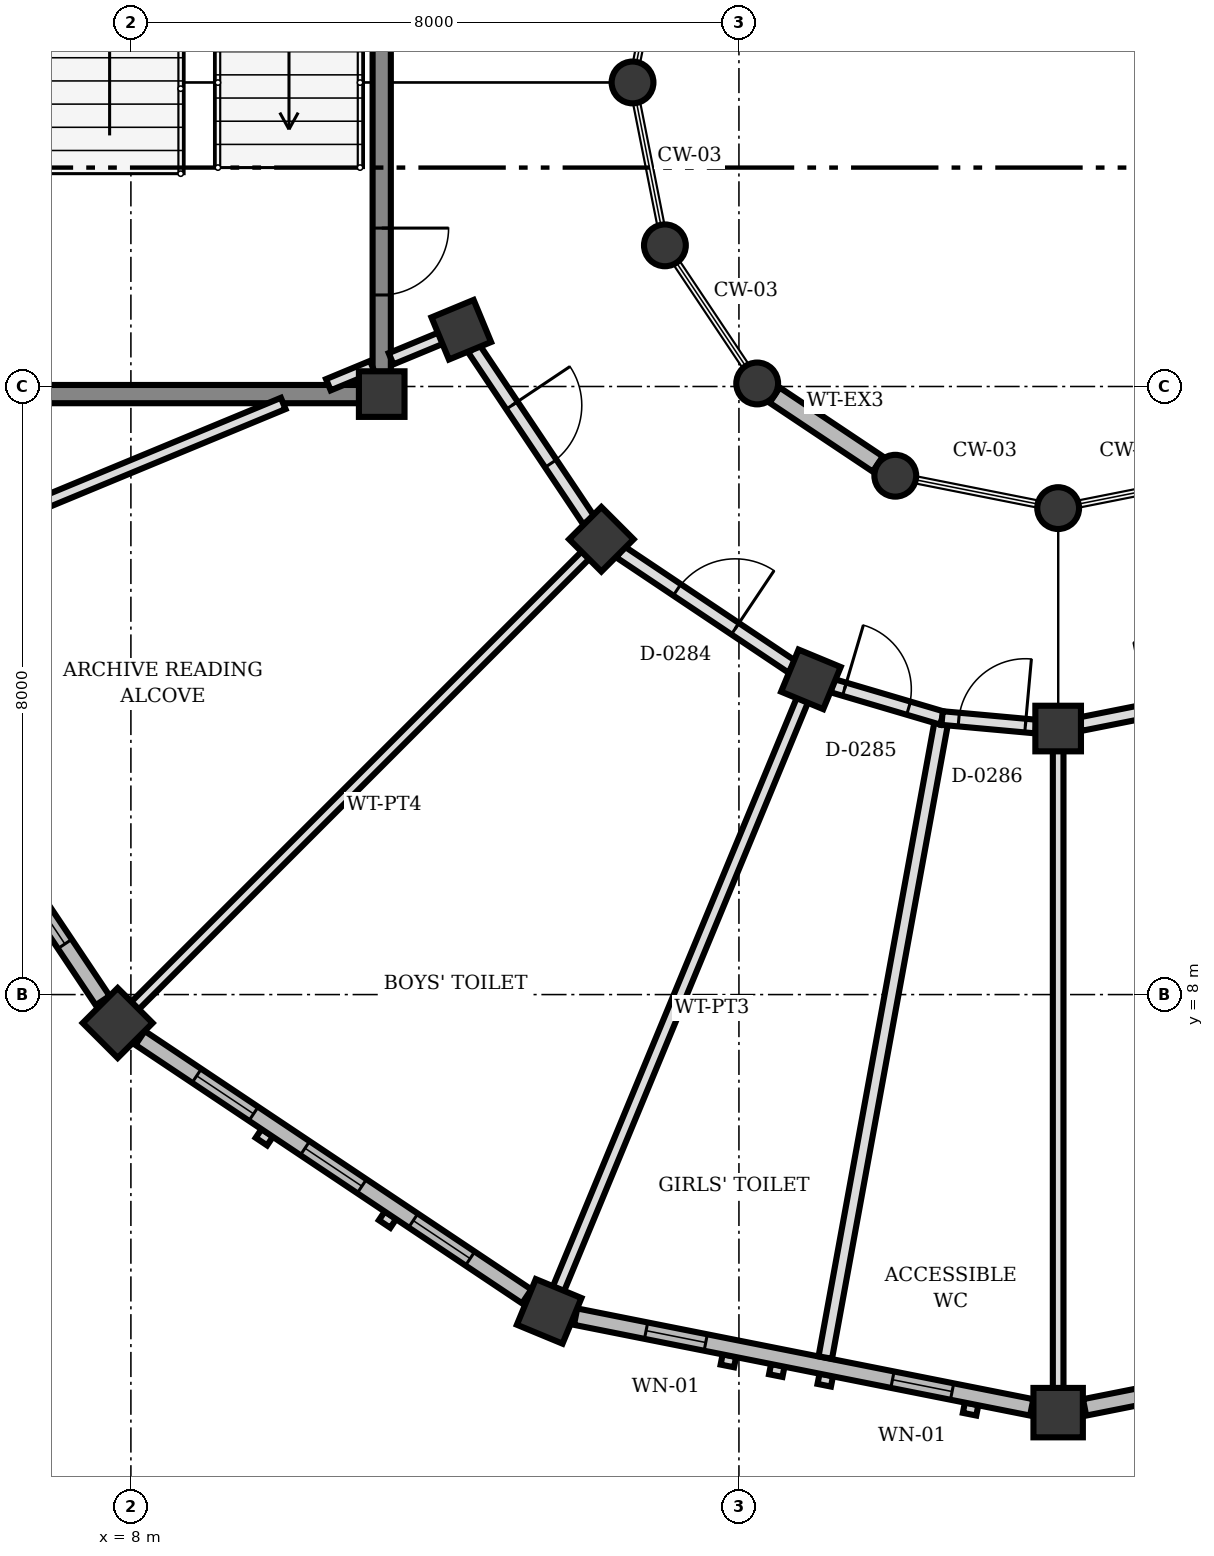
"""IFC4 building model, lengths in metres.
Left out: names, types, materials, properties, quantities, classifications, styles, units other than length and angle.
Written with IfcOpenShell. Run it as: python <this file> out.ifc"""

import sys

from ifc_helpers import new_model, si_unit, direction, frame, frame_2d, origin, origin_2d, place, context, subcontext, project, spatial, rectangle, circle, extrude, element, fill, save


model = new_model("IFC4")
c1 = context("Model", 3, precision=1e-05, world=origin(), true_north=direction((0.0, 1.0)))
c2 = subcontext(c1, "Body", "Model", "MODEL_VIEW")
j1 = project(units=[si_unit("LENGTHUNIT", "METRE"), si_unit("PLANEANGLEUNIT", "RADIAN")], contexts=[c1])
p1 = place(None, origin())
s1 = spatial("IfcSite", under=j1, at=p1, CompositionType="ELEMENT")
p2 = place(p1, origin())
s2 = spatial("IfcBuilding", under=s1, at=p2, CompositionType="ELEMENT")
p3 = place(p2, origin())
s3 = spatial("IfcBuildingStorey", under=s2, at=p3, CompositionType="ELEMENT", Elevation=0.0)
p4 = place(p3, frame((11.3, 15.9, 0.0), z_axis=(0.0, 0.0, 1.0), x_axis=(1.0, 0.0, 0.0)))
e1 = element("IfcColumn", 1, at=p4, inside=s3, PredefinedType="COLUMN", context=c2, shape_type="SweptSolid", body=[
    extrude(rectangle(XDim=0.6, YDim=0.6, at=origin_2d()), origin(), (0.0, 0.0, 1.0), 4.5),
])
for number, where, z_axis, x_axis in (
    (2, (14.6, 20.0, 0.0), (0.0, 0.0, 1.0), (1.0, 0.0, 0.0)),
    (3, (15.026, 17.857, 0.0), (0.0, 0.0, 1.0), (1.0, 0.0, 0.0)),
    (4, (16.24, 16.04, 0.0), (0.0, 0.0, 1.0), (1.0, 0.0, 0.0)),
    (5, (18.057, 14.826, 0.0), (0.0, 0.0, 1.0), (1.0, 0.0, 0.0)),
    (6, (20.2, 14.4, 0.0), (0.0, 0.0, 1.0), (1.0, 0.0, 0.0)),
):
    element("IfcColumn", number, at=place(p3, frame(where, z_axis=z_axis, x_axis=x_axis)), inside=s3, PredefinedType="COLUMN", context=c2, shape_type="SweptSolid", body=[
        extrude(circle(Radius=0.275, at=origin_2d()), origin(), (0.0, 0.0, 1.0), 4.5),
    ])
for number, where, z_axis, x_axis in (
    (7, (12.347, 16.747, 0.0), (0.0, 0.0, 1.0), (-0.924, -0.383, 0.0)),
    (8, (14.19, 13.99, 0.0), (0.0, 0.0, 1.0), (-0.707, -0.707, 0.0)),
    (9, (16.947, 12.147, 0.0), (0.0, 0.0, 1.0), (-0.383, -0.924, 0.0)),
    (10, (20.2, 11.5, 0.0), (0.0, 0.0, 1.0), (0.0, -1.0, 0.0)),
):
    element("IfcColumn", number, at=place(p3, frame(where, z_axis=z_axis, x_axis=x_axis)), inside=s3, PredefinedType="COLUMN", context=c2, shape_type="SweptSolid", body=[
        extrude(rectangle(XDim=0.6, YDim=0.6, at=origin_2d()), origin(), (0.0, 0.0, 1.0), 4.5),
    ])
for number, where, z_axis, x_axis in (
    (11, (7.826, 7.626, 0.0), (0.0, 0.0, 1.0), (-0.707, -0.707, 0.0)),
    (12, (13.503, 3.832, 0.0), (0.0, 0.0, 1.0), (-0.383, -0.924, 0.0)),
    (13, (20.2, 2.5, 0.0), (0.0, 0.0, 1.0), (0.0, -1.0, 0.0)),
):
    element("IfcColumn", number, at=place(p3, frame(where, z_axis=z_axis, x_axis=x_axis)), inside=s3, PredefinedType="COLUMN", context=c2, shape_type="SweptSolid", body=[
        extrude(rectangle(XDim=0.65, YDim=0.65, at=origin_2d()), origin(), (0.0, 0.0, 1.0), 4.5),
    ])
p5 = place(p3, frame((7.629, 7.921, 0.0), z_axis=(0.0, 0.0, 1.0), x_axis=(-0.555657446161, 0.831411331728, 0.0)))
e14 = element("IfcWall", 14, at=p5, inside=s3, PredefinedType="SOLIDWALL", context=c2, shape_type="SweptSolid", body=[
    extrude(rectangle(XDim=6.119, YDim=0.22, at=frame_2d((3.059, 0.0))), origin(), (0.0, 0.0, 1.0), 3.55),
])
p6 = place(p5, frame((0.896, 0.0, 0.85)))
e15 = element("IfcOpeningElement", 15, at=p6, cuts=e14, PredefinedType="OPENING", context=c2, shape_type="SweptSolid", body=[
    extrude(rectangle(XDim=0.9, YDim=1.4, at=frame_2d((0.45, 0.7))), frame((0.0, 0.12, 0.0), z_axis=(0.0, -1.0, 0.0), x_axis=(1.0, 0.0, 0.0)), (0.0, 0.0, 1.0), 0.24),
])
p7 = place(p5, frame((2.609, 0.0, 0.85)))
e16 = element("IfcOpeningElement", 16, at=p7, cuts=e14, PredefinedType="OPENING", context=c2, shape_type="SweptSolid", body=[
    extrude(rectangle(XDim=0.9, YDim=1.4, at=frame_2d((0.45, 0.7))), frame((0.0, 0.12, 0.0), z_axis=(0.0, -1.0, 0.0), x_axis=(1.0, 0.0, 0.0)), (0.0, 0.0, 1.0), 0.24),
])
p8 = place(p5, frame((4.323, 0.0, 0.85)))
e17 = element("IfcOpeningElement", 17, at=p8, cuts=e14, PredefinedType="OPENING", context=c2, shape_type="SweptSolid", body=[
    extrude(rectangle(XDim=0.9, YDim=1.4, at=frame_2d((0.45, 0.7))), frame((0.0, 0.12, 0.0), z_axis=(0.0, -1.0, 0.0), x_axis=(1.0, 0.0, 0.0)), (0.0, 0.0, 1.0), 0.24),
])
p9 = place(p3, frame((13.208, 4.029, 0.0), z_axis=(0.0, 0.0, 1.0), x_axis=(-0.83139901156, 0.555675879967, 0.0)))
e18 = element("IfcWall", 18, at=p9, inside=s3, PredefinedType="SOLIDWALL", context=c2, shape_type="SweptSolid", body=[
    extrude(rectangle(XDim=6.118, YDim=0.22, at=frame_2d((3.059, 0.0))), origin(), (0.0, 0.0, 1.0), 3.55),
])
p10 = place(p9, frame((0.896, 0.0, 0.85)))
e19 = element("IfcOpeningElement", 19, at=p10, cuts=e18, PredefinedType="OPENING", context=c2, shape_type="SweptSolid", body=[
    extrude(rectangle(XDim=0.9, YDim=1.4, at=frame_2d((0.45, 0.7))), frame((0.0, 0.12, 0.0), z_axis=(0.0, -1.0, 0.0), x_axis=(1.0, 0.0, 0.0)), (0.0, 0.0, 1.0), 0.24),
])
p11 = place(p9, frame((2.609, 0.0, 0.85)))
e20 = element("IfcOpeningElement", 20, at=p11, cuts=e18, PredefinedType="OPENING", context=c2, shape_type="SweptSolid", body=[
    extrude(rectangle(XDim=0.9, YDim=1.4, at=frame_2d((0.45, 0.7))), frame((0.0, 0.12, 0.0), z_axis=(0.0, -1.0, 0.0), x_axis=(1.0, 0.0, 0.0)), (0.0, 0.0, 1.0), 0.24),
])
p12 = place(p9, frame((4.323, 0.0, 0.85)))
e21 = element("IfcOpeningElement", 21, at=p12, cuts=e18, PredefinedType="OPENING", context=c2, shape_type="SweptSolid", body=[
    extrude(rectangle(XDim=0.9, YDim=1.4, at=frame_2d((0.45, 0.7))), frame((0.0, 0.12, 0.0), z_axis=(0.0, -1.0, 0.0), x_axis=(1.0, 0.0, 0.0)), (0.0, 0.0, 1.0), 0.24),
])
p13 = place(p3, frame((16.47, 15.886, 0.0), z_axis=(0.0, 0.0, 1.0), x_axis=(0.83165874011, -0.555287078904, 0.0)))
e22 = element("IfcWall", 22, at=p13, inside=s3, PredefinedType="SOLIDWALL", context=c2, shape_type="SweptSolid", body=[
    extrude(rectangle(XDim=1.632, YDim=0.24, at=frame_2d((0.816, 0.0))), origin(), (0.0, 0.0, 1.0), 3.55),
])
p14 = place(p3, frame((19.852, 2.569, 0.0), z_axis=(0.0, 0.0, 1.0), x_axis=(-0.98077967596, 0.19511849534, 0.0)))
e23 = element("IfcWall", 23, at=p14, inside=s3, PredefinedType="SOLIDWALL", context=c2, shape_type="SweptSolid", body=[
    extrude(rectangle(XDim=6.119, YDim=0.22, at=frame_2d((3.059, 0.0))), origin(), (0.0, 0.0, 1.0), 3.55),
])
p15 = place(p14, frame((1.068, 0.0, 1.15)))
e24 = element("IfcOpeningElement", 24, at=p15, cuts=e23, PredefinedType="OPENING", context=c2, shape_type="SweptSolid", body=[
    extrude(rectangle(XDim=0.8, YDim=1.1, at=frame_2d((0.4, 0.55))), frame((0.0, 0.12, 0.0), z_axis=(0.0, -1.0, 0.0), x_axis=(1.0, 0.0, 0.0)), (0.0, 0.0, 1.0), 0.24),
])
p16 = place(p14, frame((4.373, 0.0, 1.15)))
e25 = element("IfcOpeningElement", 25, at=p16, cuts=e23, PredefinedType="OPENING", context=c2, shape_type="SweptSolid", body=[
    extrude(rectangle(XDim=0.8, YDim=1.1, at=frame_2d((0.4, 0.55))), frame((0.0, 0.12, 0.0), z_axis=(0.0, -1.0, 0.0), x_axis=(1.0, 0.0, 0.0)), (0.0, 0.0, 1.0), 0.24),
])
p17 = place(p3, frame((26.549, 3.763, 0.0), z_axis=(0.0, 0.0, 1.0), x_axis=(-0.98077967596, -0.19511849534, 0.0)))
e26 = element("IfcWall", 26, at=p17, inside=s3, PredefinedType="SOLIDWALL", context=c2, shape_type="SweptSolid", body=[
    extrude(rectangle(XDim=6.119, YDim=0.22, at=frame_2d((3.059, 0.0))), origin(), (0.0, 0.0, 1.0), 3.55),
])
p18 = place(p17, frame((0.896, 0.0, 0.85)))
e27 = element("IfcOpeningElement", 27, at=p18, cuts=e26, PredefinedType="OPENING", context=c2, shape_type="SweptSolid", body=[
    extrude(rectangle(XDim=0.9, YDim=1.4, at=frame_2d((0.45, 0.7))), frame((0.0, 0.12, 0.0), z_axis=(0.0, -1.0, 0.0), x_axis=(1.0, 0.0, 0.0)), (0.0, 0.0, 1.0), 0.24),
])
p19 = place(p17, frame((2.609, 0.0, 0.85)))
e28 = element("IfcOpeningElement", 28, at=p19, cuts=e26, PredefinedType="OPENING", context=c2, shape_type="SweptSolid", body=[
    extrude(rectangle(XDim=0.9, YDim=1.4, at=frame_2d((0.45, 0.7))), frame((0.0, 0.12, 0.0), z_axis=(0.0, -1.0, 0.0), x_axis=(1.0, 0.0, 0.0)), (0.0, 0.0, 1.0), 0.24),
])
p20 = place(p17, frame((4.323, 0.0, 0.85)))
e29 = element("IfcOpeningElement", 29, at=p20, cuts=e26, PredefinedType="OPENING", context=c2, shape_type="SweptSolid", body=[
    extrude(rectangle(XDim=0.9, YDim=1.4, at=frame_2d((0.45, 0.7))), frame((0.0, 0.12, 0.0), z_axis=(0.0, -1.0, 0.0), x_axis=(1.0, 0.0, 0.0)), (0.0, 0.0, 1.0), 0.24),
])
p21 = place(p3, frame((11.3, 24.328, 0.0), z_axis=(0.0, 0.0, 1.0), x_axis=(0.0, -1.0, 0.0)))
e30 = element("IfcWall", 30, at=p21, inside=s3, PredefinedType="SHEAR", context=c2, shape_type="SweptSolid", body=[
    extrude(rectangle(XDim=8.136, YDim=0.24, at=frame_2d((4.068, 0.0))), origin(), (0.0, 0.0, 1.0), 4.24),
])
p22 = place(p21, frame((6.244, 0.0, 0.0)))
e31 = element("IfcOpeningElement", 31, at=p22, cuts=e30, PredefinedType="OPENING", context=c2, shape_type="SweptSolid", body=[
    extrude(rectangle(XDim=0.88, YDim=2.1, at=frame_2d((0.44, 1.05))), frame((0.0, 0.13, 0.0), z_axis=(0.0, -1.0, 0.0), x_axis=(1.0, 0.0, 0.0)), (0.0, 0.0, 1.0), 0.26),
])
p23 = place(p3, frame((11.008, 15.9, 0.0), z_axis=(0.0, 0.0, 1.0), x_axis=(-1.0, 0.0, 0.0)))
e32 = element("IfcWall", 32, at=p23, inside=s3, PredefinedType="SHEAR", context=c2, shape_type="SweptSolid", body=[
    extrude(rectangle(XDim=4.216, YDim=0.24, at=frame_2d((2.108, 0.0))), origin(), (0.0, 0.0, 1.0), 4.24),
])
p24 = place(p3, frame((12.077, 16.636, 0.0), z_axis=(0.0, 0.0, 1.0), x_axis=(-0.923789734747, -0.382900151445, 0.0)))
e33 = element("IfcWall", 33, at=p24, inside=s3, PredefinedType="PARTITIONING", context=c2, shape_type="SweptSolid", body=[
    extrude(rectangle(XDim=0.708, YDim=0.16, at=frame_2d((0.354, 0.0))), origin(), (0.0, 0.0, 1.0), 3.552),
])
p25 = place(p3, frame((11.177, 16.263, 0.0), z_axis=(0.0, 0.0, 1.0), x_axis=(-0.923812676193, -0.382844797933, 0.0)))
e34 = element("IfcWall", 34, at=p25, inside=s3, PredefinedType="PARTITIONING", context=c2, shape_type="SweptSolid", body=[
    extrude(rectangle(XDim=0.627, YDim=0.16, at=frame_2d((0.313, 0.0))), origin(), (0.0, 0.0, 1.0), 3.552),
])
p26 = place(p3, frame((10.004, 15.777, 0.0), z_axis=(0.0, 0.0, 1.0), x_axis=(-0.923837705987, -0.382784394923, 0.0)))
e35 = element("IfcWall", 35, at=p26, inside=s3, PredefinedType="PARTITIONING", context=c2, shape_type="SweptSolid", body=[
    extrude(rectangle(XDim=6.147, YDim=0.16, at=frame_2d((3.074, 0.0))), origin(), (0.0, 0.0, 1.0), 3.552),
])
p27 = place(p3, frame((13.984, 13.784, 0.0), z_axis=(0.0, 0.0, 1.0), x_axis=(-0.707106781187, -0.707106781187, 0.0)))
e36 = element("IfcWall", 36, at=p27, inside=s3, PredefinedType="PARTITIONING", context=c2, shape_type="SweptSolid", body=[
    extrude(rectangle(XDim=8.392, YDim=0.14, at=frame_2d((4.196, 0.0))), origin(), (0.0, 0.0, 1.0), 3.552),
])
p28 = place(p3, frame((16.836, 11.877, 0.0), z_axis=(0.0, 0.0, 1.0), x_axis=(-0.382780060664, -0.923839501839, 0.0)))
e37 = element("IfcWall", 37, at=p28, inside=s3, PredefinedType="PARTITIONING", context=c2, shape_type="SweptSolid", body=[
    extrude(rectangle(XDim=8.391, YDim=0.16, at=frame_2d((4.196, 0.0))), origin(), (0.0, 0.0, 1.0), 3.552),
])
p29 = place(p3, frame((20.2, 11.208, 0.0), z_axis=(0.0, 0.0, 1.0), x_axis=(0.0, -1.0, 0.0)))
e38 = element("IfcWall", 38, at=p29, inside=s3, PredefinedType="PARTITIONING", context=c2, shape_type="SweptSolid", body=[
    extrude(rectangle(XDim=8.391, YDim=0.14, at=frame_2d((4.196, 0.0))), origin(), (0.0, 0.0, 1.0), 3.552),
])
p30 = place(p3, frame((18.673, 11.638, 0.0), z_axis=(0.0, 0.0, 1.0), x_axis=(-0.179734485707, -0.983715159306, 0.0)))
e39 = element("IfcWall", 39, at=p30, inside=s3, PredefinedType="PARTITIONING", context=c2, shape_type="SweptSolid", body=[
    extrude(rectangle(XDim=8.552, YDim=0.18, at=frame_2d((4.276, 0.0))), origin(), (0.0, 0.0, 1.0), 3.552),
])
p31 = place(p3, frame((12.512, 16.499, 0.0), z_axis=(0.0, 0.0, 1.0), x_axis=(0.556128339679, -0.831096426298, 0.0)))
e40 = element("IfcWall", 40, at=p31, inside=s3, PredefinedType="PARTITIONING", context=c2, shape_type="SweptSolid", body=[
    extrude(rectangle(XDim=2.72, YDim=0.18, at=frame_2d((1.36, 0.0))), origin(), (0.0, 0.0, 1.0), 3.552),
])
p32 = place(p31, frame((0.9, 0.0, 0.0)))
e41 = element("IfcOpeningElement", 41, at=p32, cuts=e40, PredefinedType="OPENING", context=c2, shape_type="SweptSolid", body=[
    extrude(rectangle(XDim=0.92, YDim=2.1, at=frame_2d((0.46, 1.05))), frame((0.0, 0.1, 0.0), z_axis=(0.0, -1.0, 0.0), x_axis=(1.0, 0.0, 0.0)), (0.0, 0.0, 1.0), 0.2),
])
p33 = place(p3, frame((14.438, 13.825, 0.0), z_axis=(0.0, 0.0, 1.0), x_axis=(0.831096426298, -0.556128339679, 0.0)))
e42 = element("IfcWall", 42, at=p33, inside=s3, PredefinedType="PARTITIONING", context=c2, shape_type="SweptSolid", body=[
    extrude(rectangle(XDim=2.72, YDim=0.18, at=frame_2d((1.36, 0.0))), origin(), (0.0, 0.0, 1.0), 3.552),
])
p34 = place(p33, frame((0.9, 0.0, 0.0)))
e43 = element("IfcOpeningElement", 43, at=p34, cuts=e42, PredefinedType="OPENING", context=c2, shape_type="SweptSolid", body=[
    extrude(rectangle(XDim=0.92, YDim=2.1, at=frame_2d((0.46, 1.05))), frame((0.0, 0.1, 0.0), z_axis=(0.0, -1.0, 0.0), x_axis=(1.0, 0.0, 0.0)), (0.0, 0.0, 1.0), 0.2),
])
p35 = place(p3, frame((17.229, 12.064, 0.0), z_axis=(0.0, 0.0, 1.0), x_axis=(0.959132791877, -0.282956335051, 0.0)))
e44 = element("IfcWall", 44, at=p35, inside=s3, PredefinedType="PARTITIONING", context=c2, shape_type="SweptSolid", body=[
    extrude(rectangle(XDim=1.506, YDim=0.18, at=frame_2d((0.753, 0.0))), origin(), (0.0, 0.0, 1.0), 3.552),
])
p36 = place(p35, frame((0.166, 0.0, 0.0)))
e45 = element("IfcOpeningElement", 45, at=p36, cuts=e44, PredefinedType="OPENING", context=c2, shape_type="SweptSolid", body=[
    extrude(rectangle(XDim=0.88, YDim=2.1, at=frame_2d((0.44, 1.05))), frame((0.0, 0.1, 0.0), z_axis=(0.0, -1.0, 0.0), x_axis=(1.0, 0.0, 0.0)), (0.0, 0.0, 1.0), 0.2),
])
p37 = place(p3, frame((18.673, 11.638, 0.0), z_axis=(0.0, 0.0, 1.0), x_axis=(0.995907718878, -0.090375967372, 0.0)))
e46 = element("IfcWall", 46, at=p37, inside=s3, PredefinedType="PARTITIONING", context=c2, shape_type="SweptSolid", body=[
    extrude(rectangle(XDim=1.24, YDim=0.18, at=frame_2d((0.62, 0.0))), origin(), (0.0, 0.0, 1.0), 3.552),
])
p38 = place(p37, frame((0.22, 0.0, 0.0)))
e47 = element("IfcOpeningElement", 47, at=p38, cuts=e46, PredefinedType="OPENING", context=c2, shape_type="SweptSolid", body=[
    extrude(rectangle(XDim=0.88, YDim=2.1, at=frame_2d((0.44, 1.05))), frame((0.0, 0.1, 0.0), z_axis=(0.0, -1.0, 0.0), x_axis=(1.0, 0.0, 0.0)), (0.0, 0.0, 1.0), 0.2),
])
p39 = place(p3, frame((20.492, 11.558, 0.0), z_axis=(0.0, 0.0, 1.0), x_axis=(0.980776867939, 0.195132609565, 0.0)))
e48 = element("IfcWall", 48, at=p39, inside=s3, PredefinedType="PARTITIONING", context=c2, shape_type="SweptSolid", body=[
    extrude(rectangle(XDim=2.721, YDim=0.18, at=frame_2d((1.361, 0.0))), origin(), (0.0, 0.0, 1.0), 3.552),
])
p40 = place(p39, frame((0.901, 0.0, 0.0)))
e49 = element("IfcOpeningElement", 49, at=p40, cuts=e48, PredefinedType="OPENING", context=c2, shape_type="SweptSolid", body=[
    extrude(rectangle(XDim=0.92, YDim=2.1, at=frame_2d((0.46, 1.05))), frame((0.0, 0.1, 0.0), z_axis=(0.0, -1.0, 0.0), x_axis=(1.0, 0.0, 0.0)), (0.0, 0.0, 1.0), 0.2),
])
p41 = place(p6, origin())
e50 = element("IfcWindow", 50, at=p41, inside=s3, PartitioningType="SINGLE_PANEL", PredefinedType="WINDOW", context=c2, shape_type="SweptSolid", body=[
    extrude(rectangle(XDim=0.9, YDim=1.4, at=frame_2d((0.45, 0.7))), frame((0.0, 0.03, 0.0), z_axis=(0.0, -1.0, 0.0), x_axis=(1.0, 0.0, 0.0)), (0.0, 0.0, 1.0), 0.06),
])
fill(e15, e50)
p42 = place(p10, origin())
e51 = element("IfcWindow", 51, at=p42, inside=s3, PartitioningType="SINGLE_PANEL", PredefinedType="WINDOW", context=c2, shape_type="SweptSolid", body=[
    extrude(rectangle(XDim=0.9, YDim=1.4, at=frame_2d((0.45, 0.7))), frame((0.0, 0.03, 0.0), z_axis=(0.0, -1.0, 0.0), x_axis=(1.0, 0.0, 0.0)), (0.0, 0.0, 1.0), 0.06),
])
fill(e19, e51)
p43 = place(p11, origin())
e52 = element("IfcWindow", 52, at=p43, inside=s3, PartitioningType="SINGLE_PANEL", PredefinedType="WINDOW", context=c2, shape_type="SweptSolid", body=[
    extrude(rectangle(XDim=0.9, YDim=1.4, at=frame_2d((0.45, 0.7))), frame((0.0, 0.03, 0.0), z_axis=(0.0, -1.0, 0.0), x_axis=(1.0, 0.0, 0.0)), (0.0, 0.0, 1.0), 0.06),
])
fill(e20, e52)
p44 = place(p12, origin())
e53 = element("IfcWindow", 53, at=p44, inside=s3, PartitioningType="SINGLE_PANEL", PredefinedType="WINDOW", context=c2, shape_type="SweptSolid", body=[
    extrude(rectangle(XDim=0.9, YDim=1.4, at=frame_2d((0.45, 0.7))), frame((0.0, 0.03, 0.0), z_axis=(0.0, -1.0, 0.0), x_axis=(1.0, 0.0, 0.0)), (0.0, 0.0, 1.0), 0.06),
])
fill(e21, e53)
p45 = place(p15, origin())
e54 = element("IfcWindow", 54, at=p45, inside=s3, PartitioningType="SINGLE_PANEL", PredefinedType="WINDOW", context=c2, shape_type="SweptSolid", body=[
    extrude(rectangle(XDim=0.8, YDim=1.1, at=frame_2d((0.4, 0.55))), frame((0.0, 0.03, 0.0), z_axis=(0.0, -1.0, 0.0), x_axis=(1.0, 0.0, 0.0)), (0.0, 0.0, 1.0), 0.06),
])
fill(e24, e54)
p46 = place(p16, origin())
e55 = element("IfcWindow", 55, at=p46, inside=s3, PartitioningType="SINGLE_PANEL", PredefinedType="WINDOW", context=c2, shape_type="SweptSolid", body=[
    extrude(rectangle(XDim=0.8, YDim=1.1, at=frame_2d((0.4, 0.55))), frame((0.0, 0.03, 0.0), z_axis=(0.0, -1.0, 0.0), x_axis=(1.0, 0.0, 0.0)), (0.0, 0.0, 1.0), 0.06),
])
fill(e25, e55)
p47 = place(p22, origin())
e56 = element("IfcDoor", 56, at=p47, inside=s3, OperationType="SINGLE_SWING_LEFT", PredefinedType="DOOR", context=c2, shape_type="SweptSolid", body=[
    extrude(rectangle(XDim=0.88, YDim=2.1, at=frame_2d((0.44, 1.05))), frame((0.0, 0.025, 0.0), z_axis=(0.0, -1.0, 0.0), x_axis=(1.0, 0.0, 0.0)), (0.0, 0.0, 1.0), 0.05),
])
fill(e31, e56)
p48 = place(p32, origin())
e57 = element("IfcDoor", 57, at=p48, inside=s3, OperationType="SINGLE_SWING_LEFT", PredefinedType="DOOR", context=c2, shape_type="SweptSolid", body=[
    extrude(rectangle(XDim=0.92, YDim=2.1, at=frame_2d((0.46, 1.05))), frame((0.0, 0.025, 0.0), z_axis=(0.0, -1.0, 0.0), x_axis=(1.0, 0.0, 0.0)), (0.0, 0.0, 1.0), 0.05),
])
fill(e41, e57)
p49 = place(p34, origin())
e58 = element("IfcDoor", 58, at=p49, inside=s3, OperationType="SINGLE_SWING_RIGHT", PredefinedType="DOOR", context=c2, shape_type="SweptSolid", body=[
    extrude(rectangle(XDim=0.92, YDim=2.1, at=frame_2d((0.46, 1.05))), frame((0.0, 0.025, 0.0), z_axis=(0.0, -1.0, 0.0), x_axis=(1.0, 0.0, 0.0)), (0.0, 0.0, 1.0), 0.05),
])
fill(e43, e58)
p50 = place(p36, origin())
e59 = element("IfcDoor", 59, at=p50, inside=s3, OperationType="SINGLE_SWING_LEFT", PredefinedType="DOOR", context=c2, shape_type="SweptSolid", body=[
    extrude(rectangle(XDim=0.88, YDim=2.1, at=frame_2d((0.44, 1.05))), frame((0.0, 0.025, 0.0), z_axis=(0.0, -1.0, 0.0), x_axis=(1.0, 0.0, 0.0)), (0.0, 0.0, 1.0), 0.05),
])
fill(e45, e59)
p51 = place(p38, origin())
e60 = element("IfcDoor", 60, at=p51, inside=s3, OperationType="SINGLE_SWING_RIGHT", PredefinedType="DOOR", context=c2, shape_type="SweptSolid", body=[
    extrude(rectangle(XDim=0.88, YDim=2.1, at=frame_2d((0.44, 1.05))), frame((0.0, 0.025, 0.0), z_axis=(0.0, -1.0, 0.0), x_axis=(1.0, 0.0, 0.0)), (0.0, 0.0, 1.0), 0.05),
])
fill(e47, e60)
save(model, sys.argv[1])
